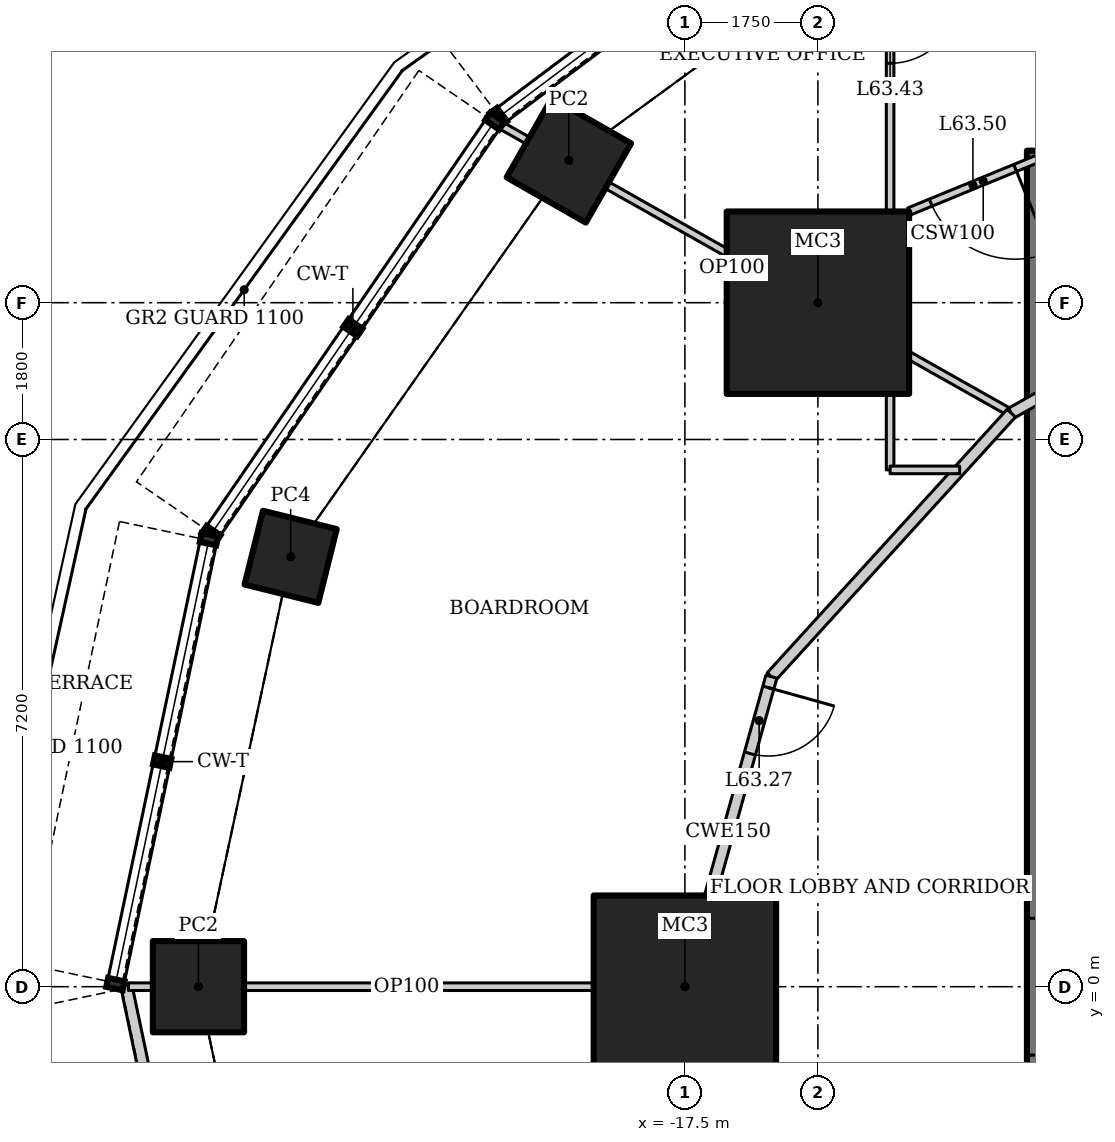
"""IFC4 building model, lengths in metres.
Left out: names, types, materials, properties, quantities, classifications, styles, units other than length and angle.
Written with IfcOpenShell. Run it as: python <this file> out.ifc"""

import sys

from ifc_helpers import new_model, si_unit, direction, frame, frame_2d, origin, origin_2d, place, context, subcontext, project, spatial, rectangle, hollow_rectangle, extrude, element, fill, save


model = new_model("IFC4")
c1 = context("Model", 3, precision=1e-05, world=origin(), true_north=direction((0.0, 1.0)))
c2 = subcontext(c1, "Body", "Model", "MODEL_VIEW")
j1 = project(units=[si_unit("LENGTHUNIT", "METRE"), si_unit("PLANEANGLEUNIT", "RADIAN")], contexts=[c1])
p1 = place(None, origin())
s1 = spatial("IfcSite", under=j1, at=p1, CompositionType="ELEMENT")
p2 = place(p1, origin())
s2 = spatial("IfcBuilding", under=s1, at=p2, CompositionType="ELEMENT")
p3 = place(p2, frame((0.0, 0.0, 270.4)))
s3 = spatial("IfcBuildingStorey", under=s2, at=p3, CompositionType="ELEMENT", Elevation=270.4)
for number, where, z_axis, x_axis in (
    (1, (-15.75, 9.0, 0.0), (0.0, 0.0, 1.0), (1.0, 0.0, 0.0)),
    (2, (-17.5, 0.0, 0.0), (0.0, 0.0, 1.0), (1.0, 0.0, 0.0)),
):
    element("IfcColumn", number, at=place(p3, frame(where, z_axis=z_axis, x_axis=x_axis)), inside=s3, PredefinedType="COLUMN", context=c2, shape_type="SweptSolid", body=[
        extrude(hollow_rectangle(XDim=2.4, YDim=2.4, WallThickness=0.12, at=origin_2d()), origin(), (0.0, 0.0, 1.0), 4.5),
    ])
p4 = place(p3, frame((-19.027, 10.873, 1.103), z_axis=(0.0, 0.0, 1.0), x_axis=(0.496139221777, 0.86824298017, 0.0)))
e3 = element("IfcColumn", 3, at=p4, inside=s3, PredefinedType="COLUMN", context=c2, shape_type="SweptSolid", body=[
    extrude(hollow_rectangle(XDim=1.2, YDim=1.2, WallThickness=0.1, at=origin_2d()), origin(), (0.0, 0.0, 1.0), 3.397),
])
p5 = place(p3, frame((-22.687, 5.656, 0.892), z_axis=(0.0, 0.0, 1.0), x_axis=(0.2419218956, 0.970295726276, 0.0)))
e4 = element("IfcColumn", 4, at=p5, inside=s3, PredefinedType="COLUMN", context=c2, shape_type="SweptSolid", body=[
    extrude(hollow_rectangle(XDim=1.0, YDim=1.0, WallThickness=0.08, at=origin_2d()), origin(), (0.0, 0.0, 1.0), 3.608),
])
p6 = place(p3, frame((-23.9, 0.0, 1.059), z_axis=(0.0, 0.0, 1.0), x_axis=(1.0, 0.0, 0.0)))
e5 = element("IfcColumn", 5, at=p6, inside=s3, PredefinedType="COLUMN", context=c2, shape_type="SweptSolid", body=[
    extrude(hollow_rectangle(XDim=1.2, YDim=1.2, WallThickness=0.1, at=origin_2d()), origin(), (0.0, 0.0, 1.0), 3.441),
])
p7 = place(p3, frame((-12.6, 11.0, 0.0), z_axis=(0.0, 0.0, 1.0), x_axis=(0.0, -1.0, 0.0)))
e6 = element("IfcWall", 6, at=p7, inside=s3, PredefinedType="SHEAR", context=c2, shape_type="SweptSolid", body=[
    extrude(rectangle(XDim=22.0, YDim=0.8, at=frame_2d((11.0, 0.0))), origin(), (0.0, 0.0, 1.0), 4.5),
])
p8 = place(p7, frame((10.1, 0.0, 0.0)))
e7 = element("IfcOpeningElement", 7, at=p8, cuts=e6, PredefinedType="OPENING", context=c2, shape_type="SweptSolid", body=[
    extrude(rectangle(XDim=1.8, YDim=2.1, at=frame_2d((0.9, 1.05))), frame((0.0, 0.41, 0.0), z_axis=(0.0, -1.0, 0.0), x_axis=(1.0, 0.0, 0.0)), (0.0, 0.0, 1.0), 0.82),
])
p9 = place(p3, frame((-24.853, 0.031, 0.0), z_axis=(0.0, 0.0, 1.0), x_axis=(0.20581124117, -0.978591709043, 0.0)))
e8 = element("IfcWall", 8, at=p9, inside=s3, PredefinedType="ELEMENTEDWALL", context=c2, shape_type="SweptSolid", body=[
    extrude(rectangle(XDim=6.052, YDim=0.15, at=frame_2d((3.026, 0.0))), origin(), (0.0, 0.0, 1.0), 4.35),
])
p10 = place(p9, frame((2.126, 0.0, 0.0)))
e9 = element("IfcOpeningElement", 9, at=p10, cuts=e8, PredefinedType="OPENING", context=c2, shape_type="SweptSolid", body=[
    extrude(rectangle(XDim=1.8, YDim=2.4, at=frame_2d((0.9, 1.2))), frame((0.0, 0.085, 0.0), z_axis=(0.0, -1.0, 0.0), x_axis=(1.0, 0.0, 0.0)), (0.0, 0.0, 1.0), 0.17),
])
p11 = place(p3, frame((-14.789, 15.251, 0.0), z_axis=(0.0, 0.0, 1.0), x_axis=(0.698752653188, -0.71536335499, 0.0)))
e10 = element("IfcWall", 10, at=p11, inside=s3, PredefinedType="PARTITIONING", context=c2, shape_type="SweptSolid", body=[
    extrude(rectangle(XDim=7.746, YDim=0.1, at=frame_2d((3.873, 0.0))), origin(), (0.0, 0.0, 1.0), 3.723),
])
p12 = place(p3, frame((-19.959, 11.355, 0.0), z_axis=(0.0, 0.0, 1.0), x_axis=(0.871035125561, -0.491220734537, 0.0)))
e11 = element("IfcWall", 11, at=p12, inside=s3, PredefinedType="PARTITIONING", context=c2, shape_type="SweptSolid", body=[
    extrude(rectangle(XDim=7.753, YDim=0.1, at=frame_2d((3.877, 0.0))), origin(), (0.0, 0.0, 1.0), 3.824),
])
p13 = place(p3, frame((-24.821, 0.0, 0.0), z_axis=(0.0, 0.0, 1.0), x_axis=(1.0, 0.0, 0.0)))
e12 = element("IfcWall", 12, at=p13, inside=s3, PredefinedType="PARTITIONING", context=c2, shape_type="SweptSolid", body=[
    extrude(rectangle(XDim=7.321, YDim=0.1, at=frame_2d((3.661, 0.0))), origin(), (0.0, 0.0, 1.0), 3.738),
])
p14 = place(p3, frame((-9.377, 9.71, 0.0), z_axis=(0.0, 0.0, 1.0), x_axis=(-0.870593853694, -0.492002379984, 0.0)))
e13 = element("IfcWall", 13, at=p14, inside=s3, PredefinedType="PARTITIONING", context=c2, shape_type="SweptSolid", body=[
    extrude(rectangle(XDim=4.398, YDim=0.15, at=frame_2d((2.199, 0.0))), origin(), (0.0, 0.0, 1.0), 4.35),
])
p15 = place(p14, frame((0.15, 0.0, 0.0)))
e14 = element("IfcOpeningElement", 14, at=p15, cuts=e13, PredefinedType="OPENING", context=c2, shape_type="SweptSolid", body=[
    extrude(rectangle(XDim=0.9, YDim=2.1, at=frame_2d((0.45, 1.05))), frame((0.0, 0.085, 0.0), z_axis=(0.0, -1.0, 0.0), x_axis=(1.0, 0.0, 0.0)), (0.0, 0.0, 1.0), 0.17),
])
p16 = place(p3, frame((-13.206, 7.546, 0.0), z_axis=(0.0, 0.0, 1.0), x_axis=(-0.67323765707, -0.739426167445, 0.0)))
e15 = element("IfcWall", 15, at=p16, inside=s3, PredefinedType="PARTITIONING", context=c2, shape_type="SweptSolid", body=[
    extrude(rectangle(XDim=4.688, YDim=0.15, at=frame_2d((2.344, 0.0))), origin(), (0.0, 0.0, 1.0), 4.35),
])
p17 = place(p3, frame((-16.362, 4.08, 0.0), z_axis=(0.0, 0.0, 1.0), x_axis=(-0.268731808547, -0.963215040931, 0.0)))
e16 = element("IfcWall", 16, at=p17, inside=s3, PredefinedType="PARTITIONING", context=c2, shape_type="SweptSolid", body=[
    extrude(rectangle(XDim=4.235, YDim=0.15, at=frame_2d((2.118, 0.0))), origin(), (0.0, 0.0, 1.0), 4.35),
])
p18 = place(p17, frame((0.15, 0.0, 0.0)))
e17 = element("IfcOpeningElement", 17, at=p18, cuts=e16, PredefinedType="OPENING", context=c2, shape_type="SweptSolid", body=[
    extrude(rectangle(XDim=0.9, YDim=2.1, at=frame_2d((0.45, 1.05))), frame((0.0, 0.085, 0.0), z_axis=(0.0, -1.0, 0.0), x_axis=(1.0, 0.0, 0.0)), (0.0, 0.0, 1.0), 0.17),
])
p19 = place(p3, frame((-17.5, 0.0, 0.0), z_axis=(0.0, 0.0, 1.0), x_axis=(0.268731808547, -0.963215040931, 0.0)))
e18 = element("IfcWall", 18, at=p19, inside=s3, PredefinedType="PARTITIONING", context=c2, shape_type="SweptSolid", body=[
    extrude(rectangle(XDim=4.235, YDim=0.15, at=frame_2d((2.118, 0.0))), origin(), (0.0, 0.0, 1.0), 4.35),
])
p20 = place(p19, frame((3.185, 0.0, 0.0)))
e19 = element("IfcOpeningElement", 19, at=p20, cuts=e18, PredefinedType="OPENING", context=c2, shape_type="SweptSolid", body=[
    extrude(rectangle(XDim=0.9, YDim=2.1, at=frame_2d((0.45, 1.05))), frame((0.0, 0.085, 0.0), z_axis=(0.0, -1.0, 0.0), x_axis=(1.0, 0.0, 0.0)), (0.0, 0.0, 1.0), 0.17),
])
p21 = place(p3, frame((-14.8, 13.2, 0.0), z_axis=(0.0, 0.0, 1.0), x_axis=(0.0, -1.0, 0.0)))
e20 = element("IfcWall", 20, at=p21, inside=s3, PredefinedType="PARTITIONING", context=c2, shape_type="SweptSolid", body=[
    extrude(rectangle(XDim=4.755, YDim=0.1, at=frame_2d((2.377, 0.0))), origin(), (0.0, 0.0, 1.0), 4.35),
])
p22 = place(p21, frame((0.15, 0.0, 0.0)))
e21 = element("IfcOpeningElement", 21, at=p22, cuts=e20, PredefinedType="OPENING", context=c2, shape_type="SweptSolid", body=[
    extrude(rectangle(XDim=0.9, YDim=2.1, at=frame_2d((0.45, 1.05))), frame((0.0, 0.06, 0.0), z_axis=(0.0, -1.0, 0.0), x_axis=(1.0, 0.0, 0.0)), (0.0, 0.0, 1.0), 0.12),
])
p23 = place(p3, frame((-14.8, 8.445, 0.0), z_axis=(0.0, 0.0, 1.0), x_axis=(0.0, -1.0, 0.0)))
e22 = element("IfcWall", 22, at=p23, inside=s3, PredefinedType="PARTITIONING", context=c2, shape_type="SweptSolid", body=[
    extrude(rectangle(XDim=1.645, YDim=0.1, at=frame_2d((0.823, 0.0))), origin(), (0.0, 0.0, 1.0), 4.35),
])
p24 = place(p3, frame((-14.8, 6.8, 0.0), z_axis=(0.0, 0.0, 1.0), x_axis=(1.0, 0.0, 0.0)))
e23 = element("IfcWall", 23, at=p24, inside=s3, PredefinedType="PARTITIONING", context=c2, shape_type="SweptSolid", body=[
    extrude(rectangle(XDim=0.915, YDim=0.1, at=frame_2d((0.458, 0.0))), origin(), (0.0, 0.0, 1.0), 4.35),
])
p25 = place(p3, frame((-12.6, 11.0, 0.0), z_axis=(0.0, 0.0, 1.0), x_axis=(-0.925157145479, -0.379584320237, 0.0)))
e24 = element("IfcWall", 24, at=p25, inside=s3, PredefinedType="PARTITIONING", context=c2, shape_type="SweptSolid", body=[
    extrude(rectangle(XDim=2.108, YDim=0.1, at=frame_2d((1.054, 0.0))), origin(), (0.0, 0.0, 1.0), 4.35),
])
p26 = place(p25, frame((0.6, 0.0, 0.0)))
e25 = element("IfcOpeningElement", 25, at=p26, cuts=e24, PredefinedType="OPENING", context=c2, shape_type="SweptSolid", body=[
    extrude(rectangle(XDim=1.2, YDim=2.1, at=frame_2d((0.6, 1.05))), frame((0.0, 0.06, 0.0), z_axis=(0.0, -1.0, 0.0), x_axis=(1.0, 0.0, 0.0)), (0.0, 0.0, 1.0), 0.12),
])
p27 = place(p18, origin())
e26 = element("IfcDoor", 26, at=p27, inside=s3, OperationType="SINGLE_SWING_LEFT", PredefinedType="DOOR", context=c2, shape_type="SweptSolid", body=[
    extrude(rectangle(XDim=0.9, YDim=2.1, at=frame_2d((0.45, 1.05))), frame((0.0, 0.025, 0.0), z_axis=(0.0, -1.0, 0.0), x_axis=(1.0, 0.0, 0.0)), (0.0, 0.0, 1.0), 0.05),
])
fill(e17, e26)
p28 = place(p22, origin())
e27 = element("IfcDoor", 27, at=p28, inside=s3, OperationType="SINGLE_SWING_LEFT", PredefinedType="DOOR", context=c2, shape_type="SweptSolid", body=[
    extrude(rectangle(XDim=0.9, YDim=2.1, at=frame_2d((0.45, 1.05))), frame((0.0, 0.025, 0.0), z_axis=(0.0, -1.0, 0.0), x_axis=(1.0, 0.0, 0.0)), (0.0, 0.0, 1.0), 0.05),
])
fill(e21, e27)
p29 = place(p26, origin())
e28 = element("IfcDoor", 28, at=p29, inside=s3, OperationType="DOUBLE_DOOR_DOUBLE_SWING", PredefinedType="DOOR", context=c2, shape_type="SweptSolid", body=[
    extrude(rectangle(XDim=1.2, YDim=2.1, at=frame_2d((0.6, 1.05))), frame((0.0, 0.025, 0.0), z_axis=(0.0, -1.0, 0.0), x_axis=(1.0, 0.0, 0.0)), (0.0, 0.0, 1.0), 0.05),
])
fill(e25, e28)
save(model, sys.argv[1])
